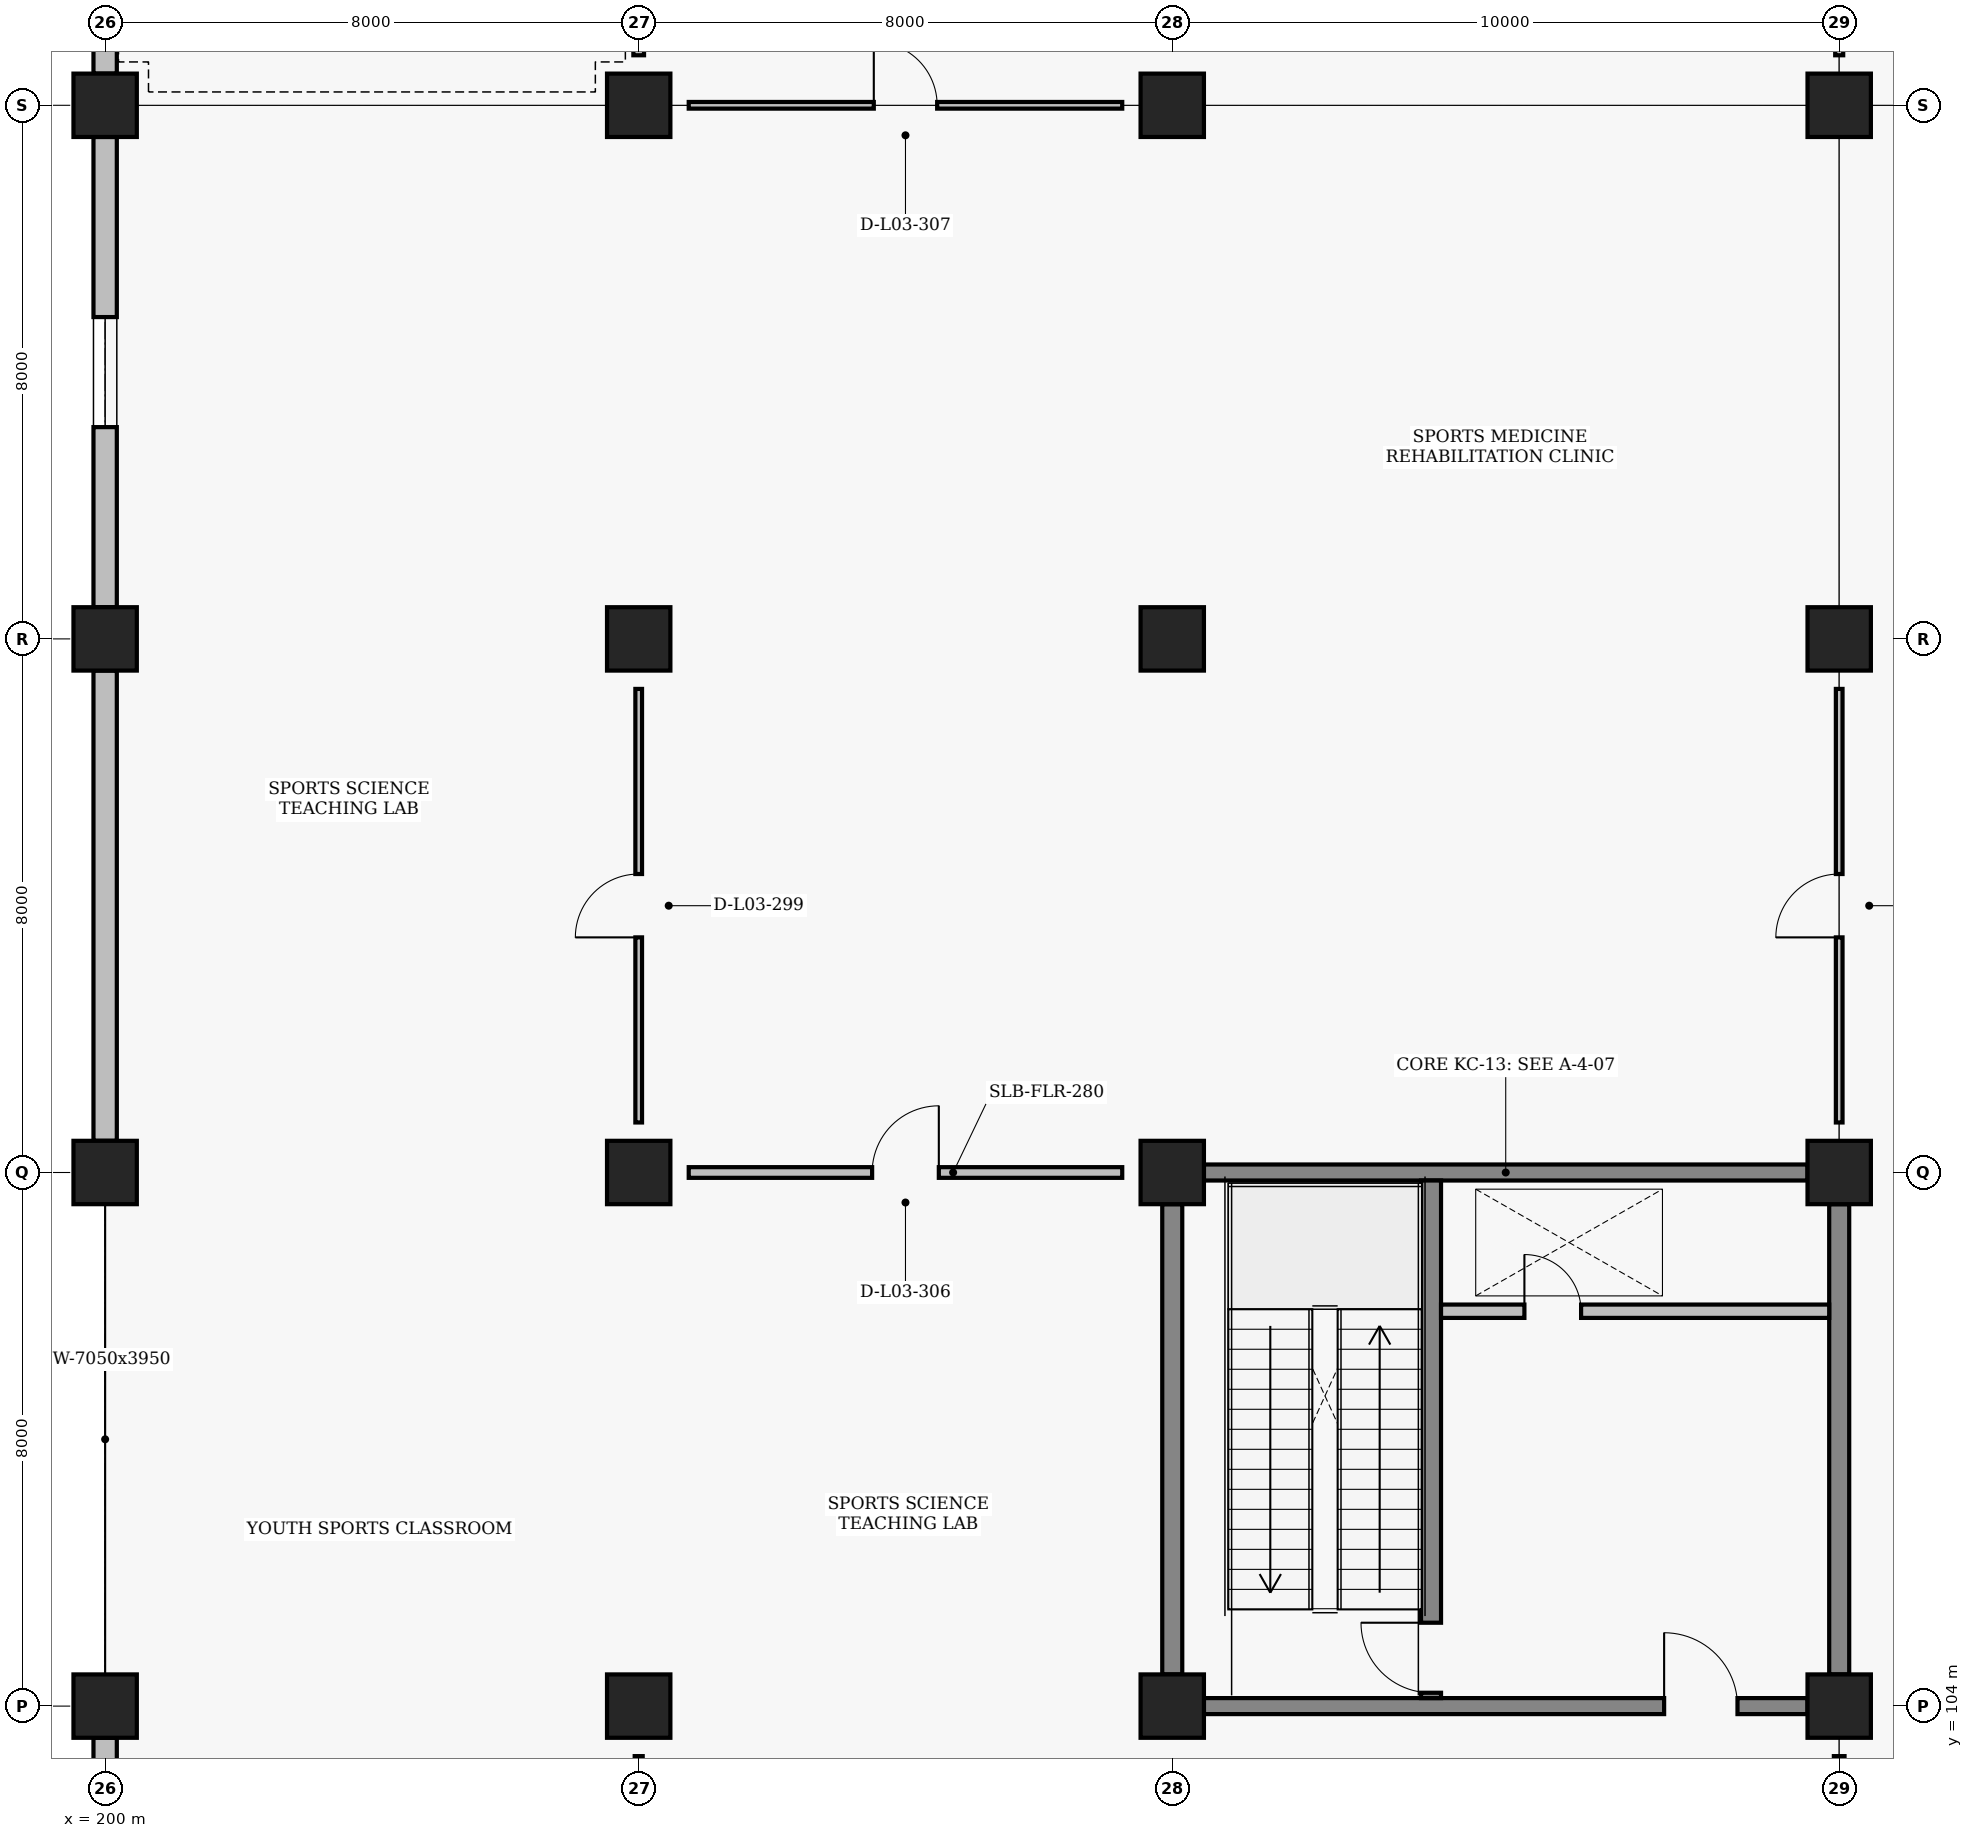
"""IFC4 building model, lengths in metres.
Left out: names, types, materials, properties, quantities, classifications, styles, units other than length and angle.
Written with IfcOpenShell. Run it as: python <this file> out.ifc"""

import sys

from ifc_helpers import new_model, si_unit, direction, frame, frame_2d, origin, origin_2d, place, context, subcontext, project, spatial, rectangle, extrude, element, fill, save


model = new_model("IFC4")
c1 = context("Model", 3, precision=1e-05, world=origin(), true_north=direction((0.0, 1.0)))
c2 = subcontext(c1, "Body", "Model", "MODEL_VIEW")
j1 = project(units=[si_unit("LENGTHUNIT", "METRE"), si_unit("PLANEANGLEUNIT", "RADIAN")], contexts=[c1])
p1 = place(None, origin())
s1 = spatial("IfcSite", under=j1, at=p1, CompositionType="ELEMENT")
p2 = place(p1, origin())
s2 = spatial("IfcBuilding", under=s1, at=p2, CompositionType="ELEMENT")
p3 = place(p2, frame((0.0, 0.0, 9.6)))
s3 = spatial("IfcBuildingStorey", under=s2, at=p3, CompositionType="ELEMENT", Elevation=9.6)
for number, where, z_axis, x_axis in (
    (1, (200.0, 104.0, 0.0), (0.0, 0.0, 1.0), (1.0, 0.0, 0.0)),
    (2, (200.0, 112.0, 0.0), (0.0, 0.0, 1.0), (1.0, 0.0, 0.0)),
    (3, (200.0, 120.0, 0.0), (0.0, 0.0, 1.0), (1.0, 0.0, 0.0)),
    (4, (200.0, 128.0, 0.0), (0.0, 0.0, 1.0), (1.0, 0.0, 0.0)),
    (5, (208.0, 104.0, 0.0), (0.0, 0.0, 1.0), (1.0, 0.0, 0.0)),
    (6, (208.0, 112.0, 0.0), (0.0, 0.0, 1.0), (1.0, 0.0, 0.0)),
    (7, (208.0, 120.0, 0.0), (0.0, 0.0, 1.0), (1.0, 0.0, 0.0)),
    (8, (208.0, 128.0, 0.0), (0.0, 0.0, 1.0), (1.0, 0.0, 0.0)),
    (9, (216.0, 104.0, 0.0), (0.0, 0.0, 1.0), (1.0, 0.0, 0.0)),
    (10, (216.0, 112.0, 0.0), (0.0, 0.0, 1.0), (1.0, 0.0, 0.0)),
    (11, (216.0, 120.0, 0.0), (0.0, 0.0, 1.0), (1.0, 0.0, 0.0)),
    (12, (216.0, 128.0, 0.0), (0.0, 0.0, 1.0), (1.0, 0.0, 0.0)),
    (13, (226.0, 104.0, 0.0), (0.0, 0.0, 1.0), (1.0, 0.0, 0.0)),
    (14, (226.0, 112.0, 0.0), (0.0, 0.0, 1.0), (1.0, 0.0, 0.0)),
    (15, (226.0, 120.0, 0.0), (0.0, 0.0, 1.0), (1.0, 0.0, 0.0)),
    (16, (226.0, 128.0, 0.0), (0.0, 0.0, 1.0), (1.0, 0.0, 0.0)),
):
    element("IfcColumn", number, at=place(p3, frame(where, z_axis=z_axis, x_axis=x_axis)), inside=s3, PredefinedType="COLUMN", context=c2, shape_type="SweptSolid", body=[
        extrude(rectangle(XDim=0.95, YDim=0.95, at=origin_2d()), origin(), (0.0, 0.0, 1.0), 4.8),
    ])
p4 = place(p3, frame((200.0, 96.475, 0.0), z_axis=(0.0, 0.0, 1.0), x_axis=(0.0, 1.0, 0.0)))
e17 = element("IfcWall", 17, at=p4, inside=s3, PredefinedType="SOLIDWALL", context=c2, shape_type="SweptSolid", body=[
    extrude(rectangle(XDim=7.05, YDim=0.35, at=frame_2d((3.525, 0.0))), origin(), (0.0, 0.0, 1.0), 3.95),
])
p5 = place(p3, frame((200.0, 112.475, 0.0), z_axis=(0.0, 0.0, 1.0), x_axis=(0.0, 1.0, 0.0)))
e18 = element("IfcWall", 18, at=p5, inside=s3, PredefinedType="SOLIDWALL", context=c2, shape_type="SweptSolid", body=[
    extrude(rectangle(XDim=7.05, YDim=0.35, at=frame_2d((3.525, 0.0))), origin(), (0.0, 0.0, 1.0), 3.72),
])
p6 = place(p3, frame((200.0, 120.475, 0.0), z_axis=(0.0, 0.0, 1.0), x_axis=(0.0, 1.0, 0.0)))
e19 = element("IfcWall", 19, at=p6, inside=s3, PredefinedType="SOLIDWALL", context=c2, shape_type="SweptSolid", body=[
    extrude(rectangle(XDim=7.05, YDim=0.35, at=frame_2d((3.525, 0.0))), origin(), (0.0, 0.0, 1.0), 3.72),
])
p7 = place(p6, frame((2.7, 0.0, 0.95)))
e20 = element("IfcOpeningElement", 20, at=p7, cuts=e19, PredefinedType="OPENING", context=c2, shape_type="SweptSolid", body=[
    extrude(rectangle(XDim=1.65, YDim=1.7, at=frame_2d((0.825, 0.85))), frame((0.0, 0.185, 0.0), z_axis=(0.0, -1.0, 0.0), x_axis=(1.0, 0.0, 0.0)), (0.0, 0.0, 1.0), 0.37),
])
p8 = place(p3, frame((200.0, 128.475, 0.0), z_axis=(0.0, 0.0, 1.0), x_axis=(0.0, 1.0, 0.0)))
e21 = element("IfcWall", 21, at=p8, inside=s3, PredefinedType="SOLIDWALL", context=c2, shape_type="SweptSolid", body=[
    extrude(rectangle(XDim=7.125, YDim=0.35, at=frame_2d((3.562, 0.0))), origin(), (0.0, 0.0, 1.0), 3.79),
])
p9 = place(p3, frame((216.475, 104.0, 0.0), z_axis=(0.0, 0.0, 1.0), x_axis=(1.0, 0.0, 0.0)))
e22 = element("IfcWall", 22, at=p9, inside=s3, PredefinedType="SHEAR", context=c2, shape_type="SweptSolid", body=[
    extrude(rectangle(XDim=9.05, YDim=0.24, at=frame_2d((4.525, 0.0))), origin(), (0.0, 0.0, 1.0), 3.83),
])
p10 = place(p9, frame((6.9, 0.0, 0.0)))
e23 = element("IfcOpeningElement", 23, at=p10, cuts=e22, PredefinedType="OPENING", context=c2, shape_type="SweptSolid", body=[
    extrude(rectangle(XDim=1.1, YDim=2.2, at=frame_2d((0.55, 1.1))), frame((0.0, 0.13, 0.0), z_axis=(0.0, -1.0, 0.0), x_axis=(1.0, 0.0, 0.0)), (0.0, 0.0, 1.0), 0.26),
])
p11 = place(p3, frame((216.475, 112.0, 0.0), z_axis=(0.0, 0.0, 1.0), x_axis=(1.0, 0.0, 0.0)))
e24 = element("IfcWall", 24, at=p11, inside=s3, PredefinedType="SHEAR", context=c2, shape_type="SweptSolid", body=[
    extrude(rectangle(XDim=9.05, YDim=0.24, at=frame_2d((4.525, 0.0))), origin(), (0.0, 0.0, 1.0), 3.68),
])
p12 = place(p3, frame((216.0, 104.475, 0.0), z_axis=(0.0, 0.0, 1.0), x_axis=(0.0, 1.0, 0.0)))
e25 = element("IfcWall", 25, at=p12, inside=s3, PredefinedType="SHEAR", context=c2, shape_type="SweptSolid", body=[
    extrude(rectangle(XDim=7.05, YDim=0.3, at=frame_2d((3.525, 0.0))), origin(), (0.0, 0.0, 1.0), 3.68),
])
p13 = place(p3, frame((226.0, 104.475, 0.0), z_axis=(0.0, 0.0, 1.0), x_axis=(0.0, 1.0, 0.0)))
e26 = element("IfcWall", 26, at=p13, inside=s3, PredefinedType="SHEAR", context=c2, shape_type="SweptSolid", body=[
    extrude(rectangle(XDim=7.05, YDim=0.3, at=frame_2d((3.525, 0.0))), origin(), (0.0, 0.0, 1.0), 3.83),
])
p14 = place(p3, frame((219.88, 104.12, 0.0), z_axis=(0.0, 0.0, 1.0), x_axis=(0.0, 1.0, 0.0)))
e27 = element("IfcWall", 27, at=p14, inside=s3, PredefinedType="SHEAR", context=c2, shape_type="SweptSolid", body=[
    extrude(rectangle(XDim=7.76, YDim=0.3, at=frame_2d((3.88, 0.0))), origin(), (0.0, 0.0, 1.0), 4.03),
])
p15 = place(p14, frame((0.08, 0.0, 0.0)))
e28 = element("IfcOpeningElement", 28, at=p15, cuts=e27, PredefinedType="OPENING", context=c2, shape_type="SweptSolid", body=[
    extrude(rectangle(XDim=1.05, YDim=2.15, at=frame_2d((0.525, 1.075))), frame((0.0, 0.16, 0.0), z_axis=(0.0, -1.0, 0.0), x_axis=(1.0, 0.0, 0.0)), (0.0, 0.0, 1.0), 0.32),
])
p16 = place(p3, frame((220.03, 109.92, 0.0), z_axis=(0.0, 0.0, 1.0), x_axis=(1.0, 0.0, 0.0)))
e29 = element("IfcWall", 29, at=p16, inside=s3, PredefinedType="PARTITIONING", context=c2, shape_type="SweptSolid", body=[
    extrude(rectangle(XDim=5.82, YDim=0.2, at=frame_2d((2.91, 0.0))), origin(), (0.0, 0.0, 1.0), 3.93),
])
p17 = place(p16, frame((1.25, 0.0, 0.0)))
e30 = element("IfcOpeningElement", 30, at=p17, cuts=e29, PredefinedType="OPENING", context=c2, shape_type="SweptSolid", body=[
    extrude(rectangle(XDim=0.85, YDim=2.05, at=frame_2d((0.425, 1.025))), frame((0.0, 0.11, 0.0), z_axis=(0.0, -1.0, 0.0), x_axis=(1.0, 0.0, 0.0)), (0.0, 0.0, 1.0), 0.22),
])
p18 = place(p3, frame((208.0, 96.75, 0.0), z_axis=(0.0, 0.0, 1.0), x_axis=(0.0, 1.0, 0.0)))
e31 = element("IfcWall", 31, at=p18, inside=s3, PredefinedType="PARTITIONING", context=c2, shape_type="SweptSolid", body=[
    extrude(rectangle(XDim=6.5, YDim=0.12, at=frame_2d((3.25, 0.0))), origin(), (0.0, 0.0, 1.0), 3.93),
])
p19 = place(p18, frame((2.75, 0.0, 0.0)))
e32 = element("IfcOpeningElement", 32, at=p19, cuts=e31, PredefinedType="OPENING", context=c2, shape_type="SweptSolid", body=[
    extrude(rectangle(XDim=1.0, YDim=2.1, at=frame_2d((0.5, 1.05))), frame((0.0, 0.07, 0.0), z_axis=(0.0, -1.0, 0.0), x_axis=(1.0, 0.0, 0.0)), (0.0, 0.0, 1.0), 0.14),
])
p20 = place(p3, frame((208.0, 112.75, 0.0), z_axis=(0.0, 0.0, 1.0), x_axis=(0.0, 1.0, 0.0)))
e33 = element("IfcWall", 33, at=p20, inside=s3, PredefinedType="PARTITIONING", context=c2, shape_type="SweptSolid", body=[
    extrude(rectangle(XDim=6.5, YDim=0.1, at=frame_2d((3.25, 0.0))), origin(), (0.0, 0.0, 1.0), 3.93),
])
p21 = place(p20, frame((2.775, 0.0, 0.0)))
e34 = element("IfcOpeningElement", 34, at=p21, cuts=e33, PredefinedType="OPENING", context=c2, shape_type="SweptSolid", body=[
    extrude(rectangle(XDim=0.95, YDim=2.1, at=frame_2d((0.475, 1.05))), frame((0.0, 0.06, 0.0), z_axis=(0.0, -1.0, 0.0), x_axis=(1.0, 0.0, 0.0)), (0.0, 0.0, 1.0), 0.12),
])
p22 = place(p3, frame((208.0, 128.75, 0.0), z_axis=(0.0, 0.0, 1.0), x_axis=(0.0, 1.0, 0.0)))
e35 = element("IfcWall", 35, at=p22, inside=s3, PredefinedType="PARTITIONING", context=c2, shape_type="SweptSolid", body=[
    extrude(rectangle(XDim=6.5, YDim=0.16, at=frame_2d((3.25, 0.0))), origin(), (0.0, 0.0, 1.0), 3.93),
])
p23 = place(p22, frame((2.75, 0.0, 0.0)))
e36 = element("IfcOpeningElement", 36, at=p23, cuts=e35, PredefinedType="OPENING", context=c2, shape_type="SweptSolid", body=[
    extrude(rectangle(XDim=1.0, YDim=2.1, at=frame_2d((0.5, 1.05))), frame((0.0, 0.09, 0.0), z_axis=(0.0, -1.0, 0.0), x_axis=(1.0, 0.0, 0.0)), (0.0, 0.0, 1.0), 0.18),
])
p24 = place(p3, frame((208.75, 112.0, 0.0), z_axis=(0.0, 0.0, 1.0), x_axis=(1.0, 0.0, 0.0)))
e37 = element("IfcWall", 37, at=p24, inside=s3, PredefinedType="PARTITIONING", context=c2, shape_type="SweptSolid", body=[
    extrude(rectangle(XDim=6.5, YDim=0.16, at=frame_2d((3.25, 0.0))), origin(), (0.0, 0.0, 1.0), 3.68),
])
p25 = place(p24, frame((2.75, 0.0, 0.0)))
e38 = element("IfcOpeningElement", 38, at=p25, cuts=e37, PredefinedType="OPENING", context=c2, shape_type="SweptSolid", body=[
    extrude(rectangle(XDim=1.0, YDim=2.1, at=frame_2d((0.5, 1.05))), frame((0.0, 0.09, 0.0), z_axis=(0.0, -1.0, 0.0), x_axis=(1.0, 0.0, 0.0)), (0.0, 0.0, 1.0), 0.18),
])
p26 = place(p3, frame((208.75, 128.0, 0.0), z_axis=(0.0, 0.0, 1.0), x_axis=(1.0, 0.0, 0.0)))
e39 = element("IfcWall", 39, at=p26, inside=s3, PredefinedType="PARTITIONING", context=c2, shape_type="SweptSolid", body=[
    extrude(rectangle(XDim=6.5, YDim=0.1, at=frame_2d((3.25, 0.0))), origin(), (0.0, 0.0, 1.0), 3.93),
])
p27 = place(p26, frame((2.775, 0.0, 0.0)))
e40 = element("IfcOpeningElement", 40, at=p27, cuts=e39, PredefinedType="OPENING", context=c2, shape_type="SweptSolid", body=[
    extrude(rectangle(XDim=0.95, YDim=2.1, at=frame_2d((0.475, 1.05))), frame((0.0, 0.06, 0.0), z_axis=(0.0, -1.0, 0.0), x_axis=(1.0, 0.0, 0.0)), (0.0, 0.0, 1.0), 0.12),
])
p28 = place(p3, frame((226.0, 96.75, 0.0), z_axis=(0.0, 0.0, 1.0), x_axis=(0.0, 1.0, 0.0)))
e41 = element("IfcWall", 41, at=p28, inside=s3, PredefinedType="PARTITIONING", context=c2, shape_type="SweptSolid", body=[
    extrude(rectangle(XDim=6.5, YDim=0.16, at=frame_2d((3.25, 0.0))), origin(), (0.0, 0.0, 1.0), 3.93),
])
p29 = place(p28, frame((2.75, 0.0, 0.0)))
e42 = element("IfcOpeningElement", 42, at=p29, cuts=e41, PredefinedType="OPENING", context=c2, shape_type="SweptSolid", body=[
    extrude(rectangle(XDim=1.0, YDim=2.1, at=frame_2d((0.5, 1.05))), frame((0.0, 0.09, 0.0), z_axis=(0.0, -1.0, 0.0), x_axis=(1.0, 0.0, 0.0)), (0.0, 0.0, 1.0), 0.18),
])
p30 = place(p3, frame((226.0, 112.75, 0.0), z_axis=(0.0, 0.0, 1.0), x_axis=(0.0, 1.0, 0.0)))
e43 = element("IfcWall", 43, at=p30, inside=s3, PredefinedType="PARTITIONING", context=c2, shape_type="SweptSolid", body=[
    extrude(rectangle(XDim=6.5, YDim=0.1, at=frame_2d((3.25, 0.0))), origin(), (0.0, 0.0, 1.0), 3.93),
])
p31 = place(p30, frame((2.775, 0.0, 0.0)))
e44 = element("IfcOpeningElement", 44, at=p31, cuts=e43, PredefinedType="OPENING", context=c2, shape_type="SweptSolid", body=[
    extrude(rectangle(XDim=0.95, YDim=2.1, at=frame_2d((0.475, 1.05))), frame((0.0, 0.06, 0.0), z_axis=(0.0, -1.0, 0.0), x_axis=(1.0, 0.0, 0.0)), (0.0, 0.0, 1.0), 0.12),
])
p32 = place(p3, frame((226.0, 128.75, 0.0), z_axis=(0.0, 0.0, 1.0), x_axis=(0.0, 1.0, 0.0)))
e45 = element("IfcWall", 45, at=p32, inside=s3, PredefinedType="PARTITIONING", context=c2, shape_type="SweptSolid", body=[
    extrude(rectangle(XDim=6.5, YDim=0.12, at=frame_2d((3.25, 0.0))), origin(), (0.0, 0.0, 1.0), 3.93),
])
p33 = place(p32, frame((2.75, 0.0, 0.0)))
e46 = element("IfcOpeningElement", 46, at=p33, cuts=e45, PredefinedType="OPENING", context=c2, shape_type="SweptSolid", body=[
    extrude(rectangle(XDim=1.0, YDim=2.1, at=frame_2d((0.5, 1.05))), frame((0.0, 0.07, 0.0), z_axis=(0.0, -1.0, 0.0), x_axis=(1.0, 0.0, 0.0)), (0.0, 0.0, 1.0), 0.14),
])
p34 = place(p7, origin())
e47 = element("IfcWindow", 47, at=p34, inside=s3, PartitioningType="SINGLE_PANEL", PredefinedType="WINDOW", context=c2, shape_type="SweptSolid", body=[
    extrude(rectangle(XDim=1.65, YDim=1.7, at=frame_2d((0.825, 0.85))), frame((0.0, 0.03, 0.0), z_axis=(0.0, -1.0, 0.0), x_axis=(1.0, 0.0, 0.0)), (0.0, 0.0, 1.0), 0.06),
])
fill(e20, e47)
p35 = place(p10, origin())
e48 = element("IfcDoor", 48, at=p35, inside=s3, OperationType="SINGLE_SWING_LEFT", PredefinedType="DOOR", context=c2, shape_type="SweptSolid", body=[
    extrude(rectangle(XDim=1.1, YDim=2.2, at=frame_2d((0.55, 1.1))), frame((0.0, 0.025, 0.0), z_axis=(0.0, -1.0, 0.0), x_axis=(1.0, 0.0, 0.0)), (0.0, 0.0, 1.0), 0.05),
])
fill(e23, e48)
p36 = place(p15, origin())
e49 = element("IfcDoor", 49, at=p36, inside=s3, OperationType="SINGLE_SWING_RIGHT", PredefinedType="DOOR", context=c2, shape_type="SweptSolid", body=[
    extrude(rectangle(XDim=1.05, YDim=2.15, at=frame_2d((0.525, 1.075))), frame((0.0, 0.025, 0.0), z_axis=(0.0, -1.0, 0.0), x_axis=(1.0, 0.0, 0.0)), (0.0, 0.0, 1.0), 0.05),
])
fill(e28, e49)
p37 = place(p17, origin())
e50 = element("IfcDoor", 50, at=p37, inside=s3, OperationType="SINGLE_SWING_LEFT", PredefinedType="TRAPDOOR", context=c2, shape_type="SweptSolid", body=[
    extrude(rectangle(XDim=0.85, YDim=2.05, at=frame_2d((0.425, 1.025))), frame((0.0, 0.025, 0.0), z_axis=(0.0, -1.0, 0.0), x_axis=(1.0, 0.0, 0.0)), (0.0, 0.0, 1.0), 0.05),
])
fill(e30, e50)
p38 = place(p21, origin())
e51 = element("IfcDoor", 51, at=p38, inside=s3, OperationType="SINGLE_SWING_LEFT", PredefinedType="DOOR", context=c2, shape_type="SweptSolid", body=[
    extrude(rectangle(XDim=0.95, YDim=2.1, at=frame_2d((0.475, 1.05))), frame((0.0, 0.025, 0.0), z_axis=(0.0, -1.0, 0.0), x_axis=(1.0, 0.0, 0.0)), (0.0, 0.0, 1.0), 0.05),
])
fill(e34, e51)
p39 = place(p25, origin())
e52 = element("IfcDoor", 52, at=p39, inside=s3, OperationType="SINGLE_SWING_RIGHT", PredefinedType="DOOR", context=c2, shape_type="SweptSolid", body=[
    extrude(rectangle(XDim=1.0, YDim=2.1, at=frame_2d((0.5, 1.05))), frame((0.0, 0.025, 0.0), z_axis=(0.0, -1.0, 0.0), x_axis=(1.0, 0.0, 0.0)), (0.0, 0.0, 1.0), 0.05),
])
fill(e38, e52)
p40 = place(p27, origin())
e53 = element("IfcDoor", 53, at=p40, inside=s3, OperationType="SINGLE_SWING_LEFT", PredefinedType="DOOR", context=c2, shape_type="SweptSolid", body=[
    extrude(rectangle(XDim=0.95, YDim=2.1, at=frame_2d((0.475, 1.05))), frame((0.0, 0.025, 0.0), z_axis=(0.0, -1.0, 0.0), x_axis=(1.0, 0.0, 0.0)), (0.0, 0.0, 1.0), 0.05),
])
fill(e40, e53)
p41 = place(p31, origin())
e54 = element("IfcDoor", 54, at=p41, inside=s3, OperationType="SINGLE_SWING_LEFT", PredefinedType="DOOR", context=c2, shape_type="SweptSolid", body=[
    extrude(rectangle(XDim=0.95, YDim=2.1, at=frame_2d((0.475, 1.05))), frame((0.0, 0.025, 0.0), z_axis=(0.0, -1.0, 0.0), x_axis=(1.0, 0.0, 0.0)), (0.0, 0.0, 1.0), 0.05),
])
fill(e44, e54)
save(model, sys.argv[1])
